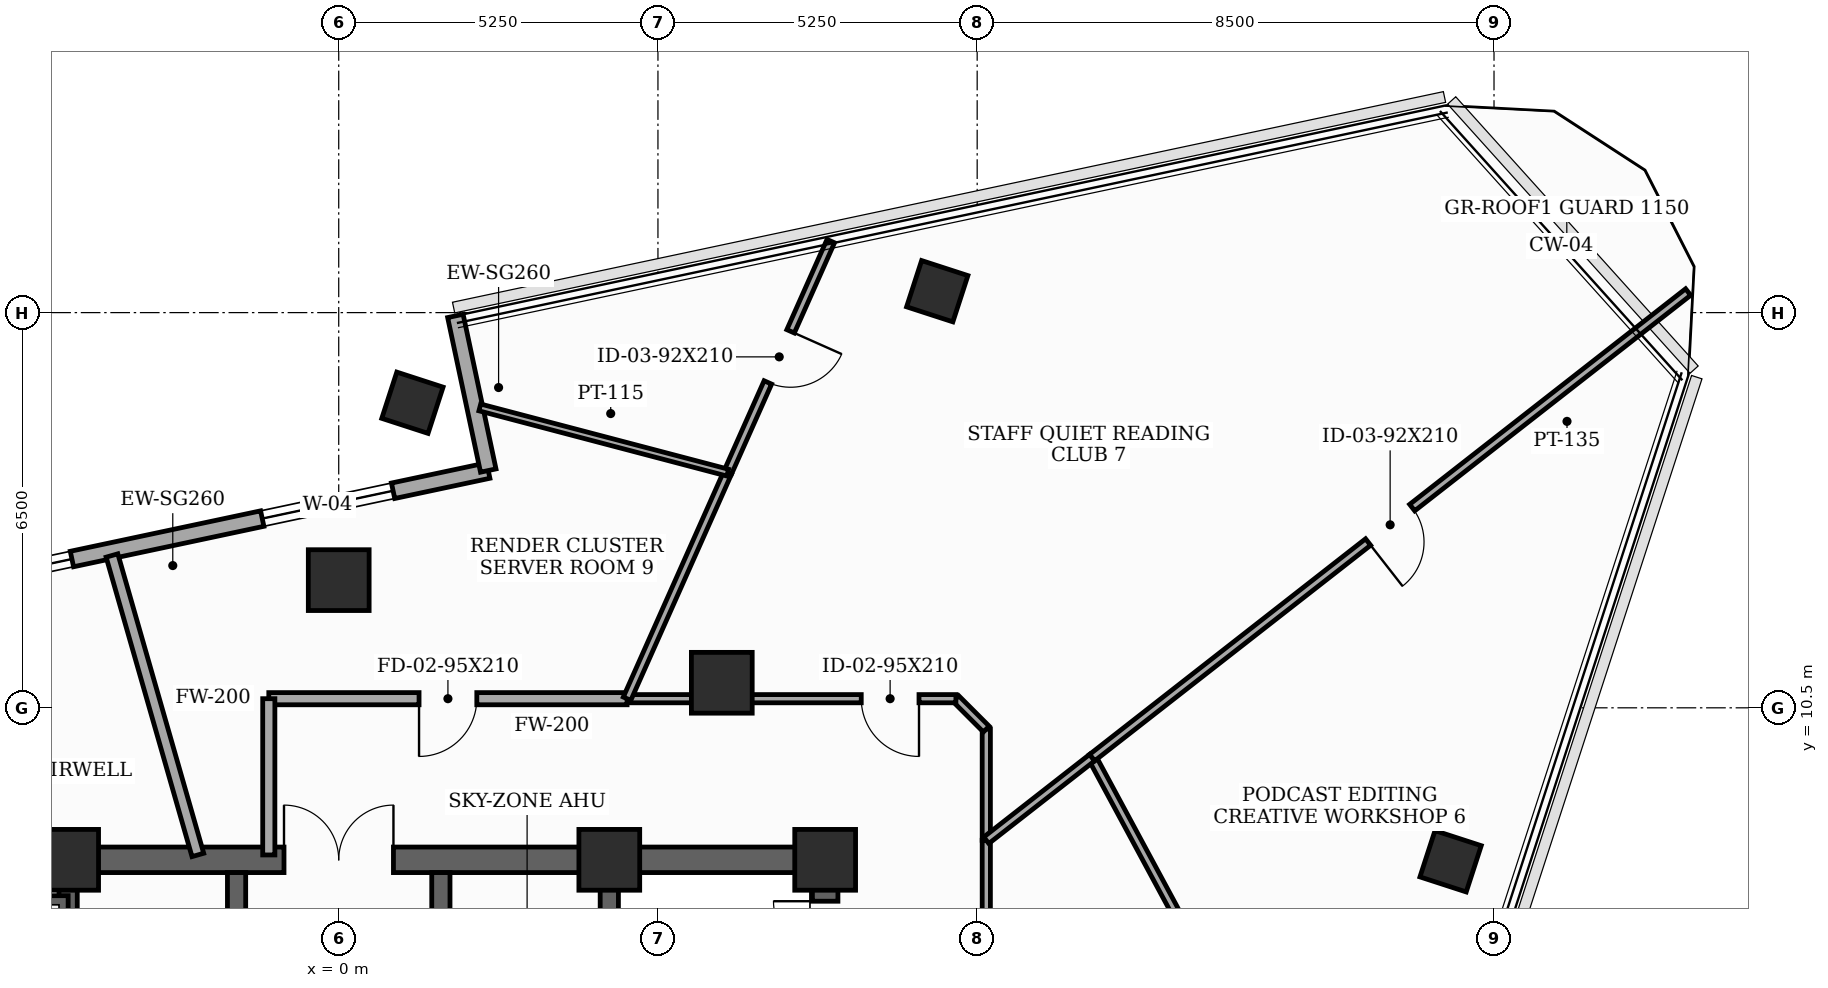
"""IFC4 building model, lengths in metres.
Left out: names, types, materials, properties, quantities, classifications, styles, units other than length and angle.
Written with IfcOpenShell. Run it as: python <this file> out.ifc"""

import sys

from ifc_helpers import new_model, si_unit, direction, frame, frame_2d, origin, origin_2d, place, context, subcontext, project, spatial, rectangle, extrude, element, fill, save


model = new_model("IFC4")
c1 = context("Model", 3, precision=1e-05, world=origin(), true_north=direction((0.0, 1.0)))
c2 = subcontext(c1, "Body", "Model", "MODEL_VIEW")
j1 = project(units=[si_unit("LENGTHUNIT", "METRE"), si_unit("PLANEANGLEUNIT", "RADIAN")], contexts=[c1])
p1 = place(None, origin())
s1 = spatial("IfcSite", under=j1, at=p1, CompositionType="ELEMENT")
p2 = place(p1, origin())
s2 = spatial("IfcBuilding", under=s1, at=p2, CompositionType="ELEMENT")
p3 = place(p2, frame((0.0, 0.0, 294.3)))
s3 = spatial("IfcBuildingStorey", under=s2, at=p3, CompositionType="ELEMENT", Elevation=294.3)
for number, where, z_axis, x_axis in (
    (1, (8.0, 8.0, 0.0), (0.0, 0.0, 1.0), (1.0, 0.0, 0.0)),
    (2, (4.45, 8.0, 0.0), (0.0, 0.0, 1.0), (1.0, 0.0, 0.0)),
    (3, (-4.45, 8.0, 0.0), (0.0, 0.0, 1.0), (1.0, 0.0, 0.0)),
    (4, (6.3, 10.912, 0.0), (0.0, 0.0, 1.0), (1.0, 0.0, 0.0)),
    (5, (0.0, 12.6, 0.0), (0.0, 0.0, 1.0), (1.0, 0.0, 0.0)),
):
    element("IfcColumn", number, at=place(p3, frame(where, z_axis=z_axis, x_axis=x_axis)), inside=s3, PredefinedType="COLUMN", context=c2, shape_type="SweptSolid", body=[
        extrude(rectangle(XDim=1.0, YDim=1.0, at=origin_2d()), origin(), (0.0, 0.0, 1.0), 3.7),
    ])
for number, where, z_axis, x_axis in (
    (6, (18.286, 7.976, 0.0), (0.0, 0.0, 1.0), (0.309, 0.951, 0.0)),
    (7, (9.844, 17.352, 0.0), (0.0, 0.0, 1.0), (0.309, 0.951, 0.0)),
    (8, (1.212, 15.518, 0.0), (0.0, 0.0, 1.0), (0.309, 0.951, 0.0)),
):
    element("IfcColumn", number, at=place(p3, frame(where, z_axis=z_axis, x_axis=x_axis)), inside=s3, PredefinedType="COLUMN", context=c2, shape_type="SweptSolid", body=[
        extrude(rectangle(XDim=0.8, YDim=0.8, at=origin_2d()), origin(), (0.0, 0.0, 1.0), 3.7),
    ])
p4 = place(p3, frame((2.459, 14.402, 0.0), z_axis=(0.0, 0.0, 1.0), x_axis=(-0.978149082982, -0.207904717268, 0.0)))
e9 = element("IfcWall", 9, at=p4, inside=s3, PredefinedType="SOLIDWALL", context=c2, shape_type="SweptSolid", body=[
    extrude(rectangle(XDim=10.8, YDim=0.26, at=frame_2d((5.4, 0.0))), origin(), (0.0, 0.0, 1.0), 3.5),
])
p5 = place(p4, frame((1.6, 0.0, 0.85)))
e10 = element("IfcOpeningElement", 10, at=p5, cuts=e9, PredefinedType="OPENING", context=c2, shape_type="SweptSolid", body=[
    extrude(rectangle(XDim=2.2, YDim=1.25, at=frame_2d((1.1, 0.625))), frame((0.0, 0.14, 0.0), z_axis=(0.0, -1.0, 0.0), x_axis=(1.0, 0.0, 0.0)), (0.0, 0.0, 1.0), 0.28),
])
p6 = place(p4, frame((7.0, 0.0, 0.85)))
e11 = element("IfcOpeningElement", 11, at=p6, cuts=e9, PredefinedType="OPENING", context=c2, shape_type="SweptSolid", body=[
    extrude(rectangle(XDim=2.2, YDim=1.25, at=frame_2d((1.1, 0.625))), frame((0.0, 0.14, 0.0), z_axis=(0.0, -1.0, 0.0), x_axis=(1.0, 0.0, 0.0)), (0.0, 0.0, 1.0), 0.28),
])
p7 = place(p3, frame((1.919, 16.946, 0.0), z_axis=(0.0, 0.0, 1.0), x_axis=(0.207893569688, -0.978151452323, 0.0)))
e12 = element("IfcWall", 12, at=p7, inside=s3, PredefinedType="SOLIDWALL", context=c2, shape_type="SweptSolid", body=[
    extrude(rectangle(XDim=2.6, YDim=0.26, at=frame_2d((1.3, 0.0))), origin(), (0.0, 0.0, 1.0), 3.5),
])
p8 = place(p3, frame((8.0, -8.0, 0.0), z_axis=(0.0, 0.0, 1.0), x_axis=(0.0, 1.0, 0.0)))
e13 = element("IfcWall", 13, at=p8, inside=s3, PredefinedType="SHEAR", context=c2, shape_type="SweptSolid", body=[
    extrude(rectangle(XDim=16.0, YDim=0.42, at=frame_2d((8.0, 0.0))), origin(), (0.0, 0.0, 1.0), 3.5),
])
p9 = place(p8, frame((9.6, 0.0, 0.0)))
e14 = element("IfcOpeningElement", 14, at=p9, cuts=e13, PredefinedType="OPENING", context=c2, shape_type="SweptSolid", body=[
    extrude(rectangle(XDim=1.05, YDim=2.15, at=frame_2d((0.525, 1.075))), frame((0.0, 0.22, 0.0), z_axis=(0.0, -1.0, 0.0), x_axis=(1.0, 0.0, 0.0)), (0.0, 0.0, 1.0), 0.44),
])
p10 = place(p8, frame((14.469, 0.0, 0.0)))
e15 = element("IfcOpeningElement", 15, at=p10, cuts=e13, PredefinedType="OPENING", context=c2, shape_type="SweptSolid", body=[
    extrude(rectangle(XDim=0.85, YDim=2.02, at=frame_2d((0.425, 1.01))), frame((0.0, 0.22, 0.0), z_axis=(0.0, -1.0, 0.0), x_axis=(1.0, 0.0, 0.0)), (0.0, 0.0, 1.0), 0.44),
])
p11 = place(p3, frame((-8.0, 8.0, 0.0), z_axis=(0.0, 0.0, 1.0), x_axis=(1.0, 0.0, 0.0)))
e16 = element("IfcWall", 16, at=p11, inside=s3, PredefinedType="SHEAR", context=c2, shape_type="SweptSolid", body=[
    extrude(rectangle(XDim=16.0, YDim=0.42, at=frame_2d((8.0, 0.0))), origin(), (0.0, 0.0, 1.0), 3.5),
])
p12 = place(p11, frame((7.1, 0.0, 0.0)))
e17 = element("IfcOpeningElement", 17, at=p12, cuts=e16, PredefinedType="OPENING", context=c2, shape_type="SweptSolid", body=[
    extrude(rectangle(XDim=1.8, YDim=2.15, at=frame_2d((0.9, 1.075))), frame((0.0, 0.22, 0.0), z_axis=(0.0, -1.0, 0.0), x_axis=(1.0, 0.0, 0.0)), (0.0, 0.0, 1.0), 0.44),
])
for number, where, z_axis, x_axis in (
    (18, (-4.45, -7.79, 0.0), (0.0, 0.0, 1.0), (0.0, 1.0, 0.0)),
    (19, (4.45, -7.79, 0.0), (0.0, 0.0, 1.0), (0.0, 1.0, 0.0)),
):
    element("IfcWall", number, at=place(p3, frame(where, z_axis=z_axis, x_axis=x_axis)), inside=s3, PredefinedType="SHEAR", context=c2, shape_type="SweptSolid", body=[
        extrude(rectangle(XDim=15.58, YDim=0.3, at=frame_2d((7.79, 0.0))), origin(), (0.0, 0.0, 1.0), 3.5),
    ])
p13 = place(p3, frame((-7.79, 7.26, 0.0), z_axis=(0.0, 0.0, 1.0), x_axis=(1.0, 0.0, 0.0)))
e20 = element("IfcWall", 20, at=p13, inside=s3, PredefinedType="SHEAR", context=c2, shape_type="SweptSolid", body=[
    extrude(rectangle(XDim=3.34, YDim=0.3, at=frame_2d((1.67, 0.0))), origin(), (0.0, 0.0, 1.0), 3.5),
])
p14 = place(p3, frame((-1.68, -4.85, 0.0), z_axis=(0.0, 0.0, 1.0), x_axis=(0.0, 1.0, 0.0)))
e21 = element("IfcWall", 21, at=p14, inside=s3, PredefinedType="SHEAR", context=c2, shape_type="SweptSolid", body=[
    extrude(rectangle(XDim=12.64, YDim=0.3, at=frame_2d((6.32, 0.0))), origin(), (0.0, 0.0, 1.0), 3.5),
])
p15 = place(p14, frame((1.65, 0.0, 0.0)))
e22 = element("IfcOpeningElement", 22, at=p15, cuts=e21, PredefinedType="OPENING", context=c2, shape_type="SweptSolid", body=[
    extrude(rectangle(XDim=0.95, YDim=2.1, at=frame_2d((0.475, 1.05))), frame((0.0, 0.16, 0.0), z_axis=(0.0, -1.0, 0.0), x_axis=(1.0, 0.0, 0.0)), (0.0, 0.0, 1.0), 0.32),
])
p16 = place(p14, frame((5.9, 0.0, 0.0)))
e23 = element("IfcOpeningElement", 23, at=p16, cuts=e21, PredefinedType="OPENING", context=c2, shape_type="SweptSolid", body=[
    extrude(rectangle(XDim=0.95, YDim=2.1, at=frame_2d((0.475, 1.05))), frame((0.0, 0.16, 0.0), z_axis=(0.0, -1.0, 0.0), x_axis=(1.0, 0.0, 0.0)), (0.0, 0.0, 1.0), 0.32),
])
p17 = place(p14, frame((10.1, 0.0, 0.0)))
e24 = element("IfcOpeningElement", 24, at=p17, cuts=e21, PredefinedType="OPENING", context=c2, shape_type="SweptSolid", body=[
    extrude(rectangle(XDim=0.95, YDim=2.1, at=frame_2d((0.475, 1.05))), frame((0.0, 0.16, 0.0), z_axis=(0.0, -1.0, 0.0), x_axis=(1.0, 0.0, 0.0)), (0.0, 0.0, 1.0), 0.32),
])
p18 = place(p3, frame((1.68, -4.85, 0.0), z_axis=(0.0, 0.0, 1.0), x_axis=(0.0, 1.0, 0.0)))
e25 = element("IfcWall", 25, at=p18, inside=s3, PredefinedType="SHEAR", context=c2, shape_type="SweptSolid", body=[
    extrude(rectangle(XDim=12.64, YDim=0.3, at=frame_2d((6.32, 0.0))), origin(), (0.0, 0.0, 1.0), 3.5),
])
p19 = place(p18, frame((0.55, 0.0, 0.0)))
e26 = element("IfcOpeningElement", 26, at=p19, cuts=e25, PredefinedType="OPENING", context=c2, shape_type="SweptSolid", body=[
    extrude(rectangle(XDim=1.1, YDim=2.1, at=frame_2d((0.55, 1.05))), frame((0.0, 0.16, 0.0), z_axis=(0.0, -1.0, 0.0), x_axis=(1.0, 0.0, 0.0)), (0.0, 0.0, 1.0), 0.32),
])
p20 = place(p18, frame((2.65, 0.0, 0.0)))
e27 = element("IfcOpeningElement", 27, at=p20, cuts=e25, PredefinedType="OPENING", context=c2, shape_type="SweptSolid", body=[
    extrude(rectangle(XDim=1.1, YDim=2.1, at=frame_2d((0.55, 1.05))), frame((0.0, 0.16, 0.0), z_axis=(0.0, -1.0, 0.0), x_axis=(1.0, 0.0, 0.0)), (0.0, 0.0, 1.0), 0.32),
])
p21 = place(p18, frame((4.75, 0.0, 0.0)))
e28 = element("IfcOpeningElement", 28, at=p21, cuts=e25, PredefinedType="OPENING", context=c2, shape_type="SweptSolid", body=[
    extrude(rectangle(XDim=1.1, YDim=2.1, at=frame_2d((0.55, 1.05))), frame((0.0, 0.16, 0.0), z_axis=(0.0, -1.0, 0.0), x_axis=(1.0, 0.0, 0.0)), (0.0, 0.0, 1.0), 0.32),
])
p22 = place(p18, frame((8.9, 0.0, 0.0)))
e29 = element("IfcOpeningElement", 29, at=p22, cuts=e25, PredefinedType="OPENING", context=c2, shape_type="SweptSolid", body=[
    extrude(rectangle(XDim=0.95, YDim=2.1, at=frame_2d((0.475, 1.05))), frame((0.0, 0.16, 0.0), z_axis=(0.0, -1.0, 0.0), x_axis=(1.0, 0.0, 0.0)), (0.0, 0.0, 1.0), 0.32),
])
p23 = place(p3, frame((10.65, 4.225, 0.0), z_axis=(0.0, 0.0, 1.0), x_axis=(0.0, 1.0, 0.0)))
e30 = element("IfcWall", 30, at=p23, inside=s3, PredefinedType="PARTITIONING", context=c2, shape_type="SweptSolid", body=[
    extrude(rectangle(XDim=4.096, YDim=0.135, at=frame_2d((2.048, 0.0))), origin(), (0.0, 0.0, 1.0), 2.885),
])
p24 = place(p3, frame((10.65, 8.321, 0.0), z_axis=(0.0, 0.0, 1.0), x_axis=(0.0, 1.0, 0.0)))
e31 = element("IfcWall", 31, at=p24, inside=s3, PredefinedType="PARTITIONING", context=c2, shape_type="SweptSolid", body=[
    extrude(rectangle(XDim=1.829, YDim=0.135, at=frame_2d((0.915, 0.0))), origin(), (0.0, 0.0, 1.0), 3.5),
])
p25 = place(p3, frame((10.65, 10.15, 0.0), z_axis=(0.0, 0.0, 1.0), x_axis=(-0.707106781187, 0.707106781187, 0.0)))
e32 = element("IfcWall", 32, at=p25, inside=s3, PredefinedType="PARTITIONING", context=c2, shape_type="SweptSolid", body=[
    extrude(rectangle(XDim=0.707, YDim=0.135, at=frame_2d((0.354, 0.0))), origin(), (0.0, 0.0, 1.0), 3.5),
])
p26 = place(p3, frame((10.15, 10.65, 0.0), z_axis=(0.0, 0.0, 1.0), x_axis=(-1.0, 0.0, 0.0)))
e33 = element("IfcWall", 33, at=p26, inside=s3, PredefinedType="PARTITIONING", context=c2, shape_type="SweptSolid", body=[
    extrude(rectangle(XDim=5.408, YDim=0.135, at=frame_2d((2.704, 0.0))), origin(), (0.0, 0.0, 1.0), 2.885),
])
p27 = place(p26, frame((0.607, 0.0, 0.0)))
e34 = element("IfcOpeningElement", 34, at=p27, cuts=e33, PredefinedType="OPENING", context=c2, shape_type="SweptSolid", body=[
    extrude(rectangle(XDim=0.95, YDim=2.1, at=frame_2d((0.475, 1.05))), frame((0.0, 0.077, 0.0), z_axis=(0.0, -1.0, 0.0), x_axis=(1.0, 0.0, 0.0)), (0.0, 0.0, 1.0), 0.155),
])
p28 = place(p3, frame((4.742, 10.65, 0.0), z_axis=(0.0, 0.0, 1.0), x_axis=(-1.0, 0.0, 0.0)))
e35 = element("IfcWall", 35, at=p28, inside=s3, PredefinedType="SOLIDWALL", context=c2, shape_type="SweptSolid", body=[
    extrude(rectangle(XDim=5.892, YDim=0.2, at=frame_2d((2.946, 0.0))), origin(), (0.0, 0.0, 1.0), 2.885),
])
p29 = place(p28, frame((2.471, 0.0, 0.0)))
e36 = element("IfcOpeningElement", 36, at=p29, cuts=e35, PredefinedType="OPENING", context=c2, shape_type="SweptSolid", body=[
    extrude(rectangle(XDim=0.95, YDim=2.1, at=frame_2d((0.475, 1.05))), frame((0.0, 0.11, 0.0), z_axis=(0.0, -1.0, 0.0), x_axis=(1.0, 0.0, 0.0)), (0.0, 0.0, 1.0), 0.22),
])
p30 = place(p3, frame((-1.15, 10.65, 0.0), z_axis=(0.0, 0.0, 1.0), x_axis=(0.0, -1.0, 0.0)))
e37 = element("IfcWall", 37, at=p30, inside=s3, PredefinedType="SOLIDWALL", context=c2, shape_type="SweptSolid", body=[
    extrude(rectangle(XDim=2.57, YDim=0.2, at=frame_2d((1.285, 0.0))), origin(), (0.0, 0.0, 1.0), 2.885),
])
p31 = place(p3, frame((15.096, 4.663, 0.0), z_axis=(0.0, 0.0, 1.0), x_axis=(-0.474498198469, 0.88025647379, 0.0)))
e38 = element("IfcWall", 38, at=p31, inside=s3, PredefinedType="PARTITIONING", context=c2, shape_type="SweptSolid", body=[
    extrude(rectangle(XDim=5.7, YDim=0.135, at=frame_2d((2.85, 0.0))), origin(), (0.0, 0.0, 1.0), 3.035),
])
p32 = place(p3, frame((12.391, 9.681, 0.0), z_axis=(0.0, 0.0, 1.0), x_axis=(-0.788124883644, -0.615515367624, 0.0)))
e39 = element("IfcWall", 39, at=p32, inside=s3, PredefinedType="PARTITIONING", context=c2, shape_type="SweptSolid", body=[
    extrude(rectangle(XDim=2.209, YDim=0.135, at=frame_2d((1.104, 0.0))), origin(), (0.0, 0.0, 1.0), 3.5),
])
p33 = place(p3, frame((22.192, 17.338, 0.0), z_axis=(0.0, 0.0, 1.0), x_axis=(-0.788015446076, -0.615655469192, 0.0)))
e40 = element("IfcWall", 40, at=p33, inside=s3, PredefinedType="PARTITIONING", context=c2, shape_type="SweptSolid", body=[
    extrude(rectangle(XDim=12.438, YDim=0.135, at=frame_2d((6.219, 0.0))), origin(), (0.0, 0.0, 1.0), 3.035),
])
p34 = place(p33, frame((5.759, 0.0, 0.0)))
e41 = element("IfcOpeningElement", 41, at=p34, cuts=e40, PredefinedType="OPENING", context=c2, shape_type="SweptSolid", body=[
    extrude(rectangle(XDim=0.92, YDim=2.1, at=frame_2d((0.46, 1.05))), frame((0.0, 0.077, 0.0), z_axis=(0.0, -1.0, 0.0), x_axis=(1.0, 0.0, 0.0)), (0.0, 0.0, 1.0), 0.155),
])
p35 = place(p3, frame((8.092, 18.176, 0.0), z_axis=(0.0, 0.0, 1.0), x_axis=(-0.406654666586, -0.91358195152, 0.0)))
e42 = element("IfcWall", 42, at=p35, inside=s3, PredefinedType="PARTITIONING", context=c2, shape_type="SweptSolid", body=[
    extrude(rectangle(XDim=4.168, YDim=0.135, at=frame_2d((2.084, 0.0))), origin(), (0.0, 0.0, 1.0), 3.035),
])
p36 = place(p35, frame((1.624, 0.0, 0.0)))
e43 = element("IfcOpeningElement", 43, at=p36, cuts=e42, PredefinedType="OPENING", context=c2, shape_type="SweptSolid", body=[
    extrude(rectangle(XDim=0.92, YDim=2.1, at=frame_2d((0.46, 1.05))), frame((0.0, 0.077, 0.0), z_axis=(0.0, -1.0, 0.0), x_axis=(1.0, 0.0, 0.0)), (0.0, 0.0, 1.0), 0.155),
])
p37 = place(p3, frame((6.397, 14.368, 0.0), z_axis=(0.0, 0.0, 1.0), x_axis=(-0.406667169341, -0.913576386177, 0.0)))
e44 = element("IfcWall", 44, at=p37, inside=s3, PredefinedType="PARTITIONING", context=c2, shape_type="SweptSolid", body=[
    extrude(rectangle(XDim=4.07, YDim=0.135, at=frame_2d((2.035, 0.0))), origin(), (0.0, 0.0, 1.0), 2.885),
])
p38 = place(p3, frame((2.32, 15.44, 0.0), z_axis=(0.0, 0.0, 1.0), x_axis=(0.967091789993, -0.254427729874, 0.0)))
e45 = element("IfcWall", 45, at=p38, inside=s3, PredefinedType="PARTITIONING", context=c2, shape_type="SweptSolid", body=[
    extrude(rectangle(XDim=4.215, YDim=0.115, at=frame_2d((2.108, 0.0))), origin(), (0.0, 0.0, 1.0), 3.5),
])
p39 = place(p3, frame((-3.729, 13.005, 0.0), z_axis=(0.0, 0.0, 1.0), x_axis=(0.275658725111, -0.961255568135, 0.0)))
e46 = element("IfcWall", 46, at=p39, inside=s3, PredefinedType="SOLIDWALL", context=c2, shape_type="SweptSolid", body=[
    extrude(rectangle(XDim=5.124, YDim=0.2, at=frame_2d((2.562, 0.0))), origin(), (0.0, 0.0, 1.0), 2.885),
])
p40 = place(p5, origin())
e47 = element("IfcWindow", 47, at=p40, inside=s3, PartitioningType="SINGLE_PANEL", PredefinedType="WINDOW", context=c2, shape_type="SweptSolid", body=[
    extrude(rectangle(XDim=2.2, YDim=1.25, at=frame_2d((1.1, 0.625))), frame((0.0, 0.03, 0.0), z_axis=(0.0, -1.0, 0.0), x_axis=(1.0, 0.0, 0.0)), (0.0, 0.0, 1.0), 0.06),
])
fill(e10, e47)
p41 = place(p6, origin())
e48 = element("IfcWindow", 48, at=p41, inside=s3, PartitioningType="SINGLE_PANEL", PredefinedType="WINDOW", context=c2, shape_type="SweptSolid", body=[
    extrude(rectangle(XDim=2.2, YDim=1.25, at=frame_2d((1.1, 0.625))), frame((0.0, 0.03, 0.0), z_axis=(0.0, -1.0, 0.0), x_axis=(1.0, 0.0, 0.0)), (0.0, 0.0, 1.0), 0.06),
])
fill(e11, e48)
p42 = place(p10, origin())
e49 = element("IfcDoor", 49, at=p42, inside=s3, OperationType="SINGLE_SWING_RIGHT", PredefinedType="TRAPDOOR", context=c2, shape_type="SweptSolid", body=[
    extrude(rectangle(XDim=0.85, YDim=2.02, at=frame_2d((0.425, 1.01))), frame((0.0, 0.025, 0.0), z_axis=(0.0, -1.0, 0.0), x_axis=(1.0, 0.0, 0.0)), (0.0, 0.0, 1.0), 0.05),
])
fill(e15, e49)
p43 = place(p12, origin())
e50 = element("IfcDoor", 50, at=p43, inside=s3, OperationType="DOUBLE_DOOR_SINGLE_SWING", PredefinedType="DOOR", context=c2, shape_type="SweptSolid", body=[
    extrude(rectangle(XDim=1.8, YDim=2.15, at=frame_2d((0.9, 1.075))), frame((0.0, 0.025, 0.0), z_axis=(0.0, -1.0, 0.0), x_axis=(1.0, 0.0, 0.0)), (0.0, 0.0, 1.0), 0.05),
])
fill(e17, e50)
p44 = place(p27, origin())
e51 = element("IfcDoor", 51, at=p44, inside=s3, OperationType="SINGLE_SWING_LEFT", PredefinedType="DOOR", context=c2, shape_type="SweptSolid", body=[
    extrude(rectangle(XDim=0.95, YDim=2.1, at=frame_2d((0.475, 1.05))), frame((0.0, 0.025, 0.0), z_axis=(0.0, -1.0, 0.0), x_axis=(1.0, 0.0, 0.0)), (0.0, 0.0, 1.0), 0.05),
])
fill(e34, e51)
p45 = place(p29, origin())
e52 = element("IfcDoor", 52, at=p45, inside=s3, OperationType="SINGLE_SWING_RIGHT", PredefinedType="DOOR", context=c2, shape_type="SweptSolid", body=[
    extrude(rectangle(XDim=0.95, YDim=2.1, at=frame_2d((0.475, 1.05))), frame((0.0, 0.025, 0.0), z_axis=(0.0, -1.0, 0.0), x_axis=(1.0, 0.0, 0.0)), (0.0, 0.0, 1.0), 0.05),
])
fill(e36, e52)
p46 = place(p34, origin())
e53 = element("IfcDoor", 53, at=p46, inside=s3, OperationType="SINGLE_SWING_RIGHT", PredefinedType="DOOR", context=c2, shape_type="SweptSolid", body=[
    extrude(rectangle(XDim=0.92, YDim=2.1, at=frame_2d((0.46, 1.05))), frame((0.0, 0.025, 0.0), z_axis=(0.0, -1.0, 0.0), x_axis=(1.0, 0.0, 0.0)), (0.0, 0.0, 1.0), 0.05),
])
fill(e41, e53)
p47 = place(p36, origin())
e54 = element("IfcDoor", 54, at=p47, inside=s3, OperationType="SINGLE_SWING_LEFT", PredefinedType="DOOR", context=c2, shape_type="SweptSolid", body=[
    extrude(rectangle(XDim=0.92, YDim=2.1, at=frame_2d((0.46, 1.05))), frame((0.0, 0.025, 0.0), z_axis=(0.0, -1.0, 0.0), x_axis=(1.0, 0.0, 0.0)), (0.0, 0.0, 1.0), 0.05),
])
fill(e43, e54)
save(model, sys.argv[1])
